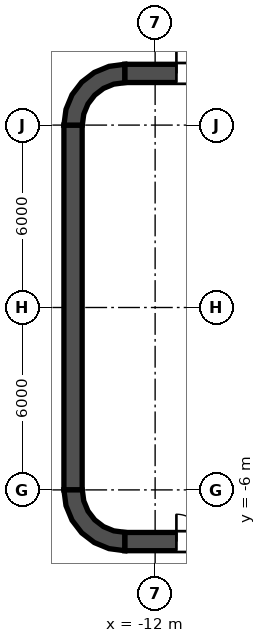
"""IFC4 building model, lengths in metres.
Left out: names, types, materials, properties, quantities, classifications, styles, units other than length and angle.
Written with IfcOpenShell. Run it as: python <this file> out.ifc"""

import sys

from ifc_helpers import new_model, si_unit, direction, frame, frame_2d, origin, place, context, subcontext, project, spatial, polyline, rectangle, outline, extrude, element, fill, save


model = new_model("IFC4")
c1 = context("Model", 3, precision=1e-05, world=origin(), true_north=direction((0.0, 1.0)))
c2 = subcontext(c1, "Body", "Model", "MODEL_VIEW")
j1 = project(units=[si_unit("LENGTHUNIT", "METRE"), si_unit("PLANEANGLEUNIT", "RADIAN")], contexts=[c1])
p1 = place(None, origin())
s1 = spatial("IfcSite", under=j1, at=p1, CompositionType="ELEMENT")
p2 = place(p1, origin())
s2 = spatial("IfcBuilding", under=s1, at=p2, CompositionType="ELEMENT")
p3 = place(p2, origin())
s3 = spatial("IfcBuildingStorey", under=s2, at=p3, CompositionType="ELEMENT", Elevation=0.0)
p4 = place(p3, frame((-13.0, 7.7, 0.0), z_axis=(0.0, 0.0, 1.0), x_axis=(1.0, 0.0, 0.0)))
e1 = element("IfcWall", 1, at=p4, inside=s3, PredefinedType="SHEAR", context=c2, shape_type="SweptSolid", body=[
    extrude(rectangle(XDim=26.0, YDim=0.6, at=frame_2d((13.0, 0.0))), origin(), (0.0, 0.0, 1.0), 8.0),
])
p5 = place(p4, frame((1.7, 0.0, 0.0)))
e2 = element("IfcOpeningElement", 2, at=p5, cuts=e1, PredefinedType="OPENING", context=c2, shape_type="SweptSolid", body=[
    extrude(rectangle(XDim=1.8, YDim=2.1, at=frame_2d((0.9, 1.05))), frame((0.0, 0.3, 0.0), z_axis=(0.0, -1.0, 0.0), x_axis=(1.0, 0.0, 0.0)), (0.0, 0.0, 1.0), 0.6),
])
p6 = place(p4, frame((22.5, 0.0, 0.0)))
e3 = element("IfcOpeningElement", 3, at=p6, cuts=e1, PredefinedType="OPENING", context=c2, shape_type="SweptSolid", body=[
    extrude(rectangle(XDim=1.8, YDim=2.1, at=frame_2d((0.9, 1.05))), frame((0.0, 0.3, 0.0), z_axis=(0.0, -1.0, 0.0), x_axis=(1.0, 0.0, 0.0)), (0.0, 0.0, 1.0), 0.6),
])
p7 = place(p3, frame((-13.0, -7.7, 0.0), z_axis=(0.0, 0.0, 1.0), x_axis=(1.0, 0.0, 0.0)))
e4 = element("IfcWall", 4, at=p7, inside=s3, PredefinedType="SHEAR", context=c2, shape_type="SweptSolid", body=[
    extrude(rectangle(XDim=26.0, YDim=0.6, at=frame_2d((13.0, 0.0))), origin(), (0.0, 0.0, 1.0), 8.0),
])
p8 = place(p7, frame((1.7, 0.0, 0.0)))
e5 = element("IfcOpeningElement", 5, at=p8, cuts=e4, PredefinedType="OPENING", context=c2, shape_type="SweptSolid", body=[
    extrude(rectangle(XDim=1.8, YDim=2.1, at=frame_2d((0.9, 1.05))), frame((0.0, 0.3, 0.0), z_axis=(0.0, -1.0, 0.0), x_axis=(1.0, 0.0, 0.0)), (0.0, 0.0, 1.0), 0.6),
])
p9 = place(p7, frame((22.5, 0.0, 0.0)))
e6 = element("IfcOpeningElement", 6, at=p9, cuts=e4, PredefinedType="OPENING", context=c2, shape_type="SweptSolid", body=[
    extrude(rectangle(XDim=1.8, YDim=2.1, at=frame_2d((0.9, 1.05))), frame((0.0, 0.3, 0.0), z_axis=(0.0, -1.0, 0.0), x_axis=(1.0, 0.0, 0.0)), (0.0, 0.0, 1.0), 0.6),
])
p10 = place(p3, frame((-14.7, -6.0, 0.0), z_axis=(0.0, 0.0, 1.0), x_axis=(0.0, 1.0, 0.0)))
e7 = element("IfcWall", 7, at=p10, inside=s3, PredefinedType="SHEAR", context=c2, shape_type="SweptSolid", body=[
    extrude(rectangle(XDim=12.0, YDim=0.6, at=frame_2d((6.0, 0.0))), origin(), (0.0, 0.0, 1.0), 8.0),
])
p11 = place(p3, origin())
e8 = element("IfcWall", 8, at=p11, inside=s3, PredefinedType="SHEAR", context=c2, shape_type="SweptSolid", body=[
    extrude(outline(polyline([(-15.0, 6.0), (-14.395, 6.0), (-14.347, 6.361), (-14.208, 6.698), (-13.986, 6.986), (-13.698, 7.208), (-13.361, 7.347), (-13.0, 7.395), (-13.0, 8.0), (-13.518, 7.932), (-14.0, 7.732), (-14.414, 7.414), (-14.732, 7.0), (-14.932, 6.518), (-15.0, 6.0)])), origin(), (0.0, 0.0, 1.0), 8.0),
])
e9 = element("IfcWall", 9, at=p11, inside=s3, PredefinedType="SHEAR", context=c2, shape_type="SweptSolid", body=[
    extrude(outline(polyline([(-13.0, -8.0), (-13.0, -7.395), (-13.361, -7.347), (-13.698, -7.208), (-13.986, -6.986), (-14.208, -6.698), (-14.347, -6.361), (-14.395, -6.0), (-15.0, -6.0), (-14.932, -6.518), (-14.732, -7.0), (-14.414, -7.414), (-14.0, -7.732), (-13.518, -7.932), (-13.0, -8.0)])), origin(), (0.0, 0.0, 1.0), 8.0),
])
p12 = place(p3, frame((-11.8, -7.4, 0.0), z_axis=(0.0, 0.0, 1.0), x_axis=(0.0, 1.0, 0.0)))
e10 = element("IfcWall", 10, at=p12, inside=s3, PredefinedType="SOLIDWALL", context=c2, shape_type="SweptSolid", body=[
    extrude(rectangle(XDim=14.8, YDim=0.4, at=frame_2d((7.4, 0.0))), origin(), (0.0, 0.0, 1.0), 7.8),
])
p13 = place(p12, frame((11.2, 0.0, 0.0)))
e11 = element("IfcOpeningElement", 11, at=p13, cuts=e10, PredefinedType="OPENING", context=c2, shape_type="SweptSolid", body=[
    extrude(rectangle(XDim=1.1, YDim=2.1, at=frame_2d((0.55, 1.05))), frame((0.0, 0.2, 0.0), z_axis=(0.0, -1.0, 0.0), x_axis=(1.0, 0.0, 0.0)), (0.0, 0.0, 1.0), 0.4),
])
p14 = place(p12, frame((8.3, 0.0, 0.0)))
e12 = element("IfcOpeningElement", 12, at=p14, cuts=e10, PredefinedType="OPENING", context=c2, shape_type="SweptSolid", body=[
    extrude(rectangle(XDim=1.1, YDim=2.1, at=frame_2d((0.55, 1.05))), frame((0.0, 0.2, 0.0), z_axis=(0.0, -1.0, 0.0), x_axis=(1.0, 0.0, 0.0)), (0.0, 0.0, 1.0), 0.4),
])
p15 = place(p12, frame((5.4, 0.0, 0.0)))
e13 = element("IfcOpeningElement", 13, at=p15, cuts=e10, PredefinedType="OPENING", context=c2, shape_type="SweptSolid", body=[
    extrude(rectangle(XDim=1.1, YDim=2.1, at=frame_2d((0.55, 1.05))), frame((0.0, 0.2, 0.0), z_axis=(0.0, -1.0, 0.0), x_axis=(1.0, 0.0, 0.0)), (0.0, 0.0, 1.0), 0.4),
])
p16 = place(p12, frame((2.5, 0.0, 0.0)))
e14 = element("IfcOpeningElement", 14, at=p16, cuts=e10, PredefinedType="OPENING", context=c2, shape_type="SweptSolid", body=[
    extrude(rectangle(XDim=1.1, YDim=2.1, at=frame_2d((0.55, 1.05))), frame((0.0, 0.2, 0.0), z_axis=(0.0, -1.0, 0.0), x_axis=(1.0, 0.0, 0.0)), (0.0, 0.0, 1.0), 0.4),
])
p17 = place(p12, frame((13.552, 0.0, 0.0)))
e15 = element("IfcOpeningElement", 15, at=p17, cuts=e10, PredefinedType="OPENING", context=c2, shape_type="SweptSolid", body=[
    extrude(rectangle(XDim=0.9, YDim=2.1, at=frame_2d((0.45, 1.05))), frame((0.0, 0.2, 0.0), z_axis=(0.0, -1.0, 0.0), x_axis=(1.0, 0.0, 0.0)), (0.0, 0.0, 1.0), 0.4),
])
p18 = place(p12, frame((0.347, 0.0, 0.0)))
e16 = element("IfcOpeningElement", 16, at=p18, cuts=e10, PredefinedType="OPENING", context=c2, shape_type="SweptSolid", body=[
    extrude(rectangle(XDim=0.9, YDim=2.1, at=frame_2d((0.45, 1.05))), frame((0.0, 0.2, 0.0), z_axis=(0.0, -1.0, 0.0), x_axis=(1.0, 0.0, 0.0)), (0.0, 0.0, 1.0), 0.4),
])
e17 = element("IfcWall", 17, at=p11, inside=s3, PredefinedType="SOLIDWALL", context=c2, shape_type="SweptSolid", body=[
    extrude(outline(polyline([(-12.0, -5.925), (-12.0, -5.675), (-14.15, -5.675), (-14.15, -3.025), (-12.0, -3.025), (-12.0, -2.775), (-14.15, -2.775), (-14.15, -0.125), (-12.0, -0.125), (-12.0, 0.125), (-14.15, 0.125), (-14.15, 2.775), (-12.0, 2.775), (-12.0, 3.025), (-14.15, 3.025), (-14.15, 5.675), (-12.0, 5.675), (-12.0, 5.925), (-14.15, 5.925), (-14.4, 5.925), (-14.4, 5.675), (-14.4, 3.025), (-14.4, 2.775), (-14.4, 0.125), (-14.4, -0.125), (-14.4, -2.775), (-14.4, -3.025), (-14.4, -5.675), (-14.4, -5.925), (-14.15, -5.925), (-12.0, -5.925)])), origin(), (0.0, 0.0, 1.0), 7.8),
])
p19 = place(p13, origin())
e18 = element("IfcDoor", 18, at=p19, inside=s3, OperationType="DOUBLE_DOOR_SLIDING", PredefinedType="DOOR", context=c2, shape_type="SweptSolid", body=[
    extrude(rectangle(XDim=1.1, YDim=2.1, at=frame_2d((0.55, 1.05))), frame((0.0, 0.025, 0.0), z_axis=(0.0, -1.0, 0.0), x_axis=(1.0, 0.0, 0.0)), (0.0, 0.0, 1.0), 0.05),
])
fill(e11, e18)
p20 = place(p14, origin())
e19 = element("IfcDoor", 19, at=p20, inside=s3, OperationType="DOUBLE_DOOR_SLIDING", PredefinedType="DOOR", context=c2, shape_type="SweptSolid", body=[
    extrude(rectangle(XDim=1.1, YDim=2.1, at=frame_2d((0.55, 1.05))), frame((0.0, 0.025, 0.0), z_axis=(0.0, -1.0, 0.0), x_axis=(1.0, 0.0, 0.0)), (0.0, 0.0, 1.0), 0.05),
])
fill(e12, e19)
p21 = place(p15, origin())
e20 = element("IfcDoor", 20, at=p21, inside=s3, OperationType="DOUBLE_DOOR_SLIDING", PredefinedType="DOOR", context=c2, shape_type="SweptSolid", body=[
    extrude(rectangle(XDim=1.1, YDim=2.1, at=frame_2d((0.55, 1.05))), frame((0.0, 0.025, 0.0), z_axis=(0.0, -1.0, 0.0), x_axis=(1.0, 0.0, 0.0)), (0.0, 0.0, 1.0), 0.05),
])
fill(e13, e20)
p22 = place(p16, origin())
e21 = element("IfcDoor", 21, at=p22, inside=s3, OperationType="DOUBLE_DOOR_SLIDING", PredefinedType="DOOR", context=c2, shape_type="SweptSolid", body=[
    extrude(rectangle(XDim=1.1, YDim=2.1, at=frame_2d((0.55, 1.05))), frame((0.0, 0.025, 0.0), z_axis=(0.0, -1.0, 0.0), x_axis=(1.0, 0.0, 0.0)), (0.0, 0.0, 1.0), 0.05),
])
fill(e14, e21)
p23 = place(p17, origin())
e22 = element("IfcDoor", 22, at=p23, inside=s3, OperationType="SINGLE_SWING_LEFT", PredefinedType="DOOR", context=c2, shape_type="SweptSolid", body=[
    extrude(rectangle(XDim=0.9, YDim=2.1, at=frame_2d((0.45, 1.05))), frame((0.0, 0.025, 0.0), z_axis=(0.0, -1.0, 0.0), x_axis=(1.0, 0.0, 0.0)), (0.0, 0.0, 1.0), 0.05),
])
fill(e15, e22)
p24 = place(p18, origin())
e23 = element("IfcDoor", 23, at=p24, inside=s3, OperationType="SINGLE_SWING_LEFT", PredefinedType="DOOR", context=c2, shape_type="SweptSolid", body=[
    extrude(rectangle(XDim=0.9, YDim=2.1, at=frame_2d((0.45, 1.05))), frame((0.0, 0.025, 0.0), z_axis=(0.0, -1.0, 0.0), x_axis=(1.0, 0.0, 0.0)), (0.0, 0.0, 1.0), 0.05),
])
fill(e16, e23)
p25 = place(p5, origin())
e24 = element("IfcDoor", 24, at=p25, inside=s3, OperationType="DOUBLE_DOOR_SINGLE_SWING", PredefinedType="DOOR", context=c2, shape_type="SweptSolid", body=[
    extrude(rectangle(XDim=1.8, YDim=2.1, at=frame_2d((0.9, 1.05))), frame((0.0, 0.025, 0.0), z_axis=(0.0, -1.0, 0.0), x_axis=(1.0, 0.0, 0.0)), (0.0, 0.0, 1.0), 0.05),
])
fill(e2, e24)
p26 = place(p8, origin())
e25 = element("IfcDoor", 25, at=p26, inside=s3, OperationType="DOUBLE_DOOR_SINGLE_SWING", PredefinedType="DOOR", context=c2, shape_type="SweptSolid", body=[
    extrude(rectangle(XDim=1.8, YDim=2.1, at=frame_2d((0.9, 1.05))), frame((0.0, 0.025, 0.0), z_axis=(0.0, -1.0, 0.0), x_axis=(1.0, 0.0, 0.0)), (0.0, 0.0, 1.0), 0.05),
])
fill(e5, e25)
save(model, sys.argv[1])
